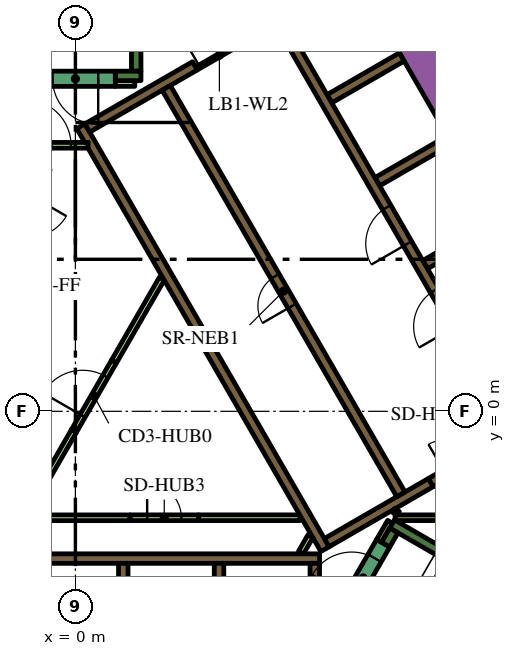
"""IFC4 building model, lengths in metres.
Left out: names, types, materials, properties, quantities, classifications, styles, units other than length and angle.
Written with IfcOpenShell. Run it as: python <this file> out.ifc"""

import sys

from ifc_helpers import new_model, si_unit, direction, frame, frame_2d, origin, place, context, subcontext, project, spatial, polyline, rectangle, outline, extrude, element, fill, save


model = new_model("IFC4")
c1 = context("Model", 3, precision=1e-05, world=origin(), true_north=direction((0.0, 1.0)))
c2 = subcontext(c1, "Body", "Model", "MODEL_VIEW")
j1 = project(units=[si_unit("LENGTHUNIT", "METRE"), si_unit("PLANEANGLEUNIT", "RADIAN")], contexts=[c1])
p1 = place(None, origin())
s1 = spatial("IfcSite", under=j1, at=p1, CompositionType="ELEMENT")
p2 = place(p1, origin())
s2 = spatial("IfcBuilding", under=s1, at=p2, CompositionType="ELEMENT")
p3 = place(p2, frame((0.0, 0.0, 54.9)))
s3 = spatial("IfcBuildingStorey", under=s2, at=p3, CompositionType="ELEMENT", Elevation=54.9)
p4 = place(p3, frame((6.776, 13.364, 0.0), z_axis=(0.0, 0.0, 1.0), x_axis=(0.500004177138, -0.8660229921, 0.0)))
e1 = element("IfcWall", 1, at=p4, inside=s3, PredefinedType="SOLIDWALL", context=c2, shape_type="SweptSolid", body=[
    extrude(rectangle(XDim=20.204, YDim=0.9, at=frame_2d((10.102, 0.0))), origin(), (0.0, 0.0, 1.0), 3.9),
])
p5 = place(p3, frame((8.334, -2.964, 0.0), z_axis=(0.0, 0.0, 1.0), x_axis=(0.866016039709, -0.500016218704, 0.0)))
e2 = element("IfcWall", 2, at=p5, inside=s3, PredefinedType="SOLIDWALL", context=c2, shape_type="SweptSolid", body=[
    extrude(rectangle(XDim=7.05, YDim=0.25, at=frame_2d((3.525, 0.0))), origin(), (0.0, 0.0, 1.0), 3.9),
])
p6 = place(p3, frame((8.163, -3.511, 0.0), z_axis=(0.0, 0.0, 1.0), x_axis=(0.500127794843, 0.865951608824, 0.0)))
e3 = element("IfcWall", 3, at=p6, inside=s3, PredefinedType="SOLIDWALL", context=c2, shape_type="SweptSolid", body=[
    extrude(rectangle(XDim=0.435, YDim=0.25, at=frame_2d((0.217, 0.0))), origin(), (0.0, 0.0, 1.0), 3.9),
])
p7 = place(p3, frame((1.6, 8.95, 0.0), z_axis=(0.0, 0.0, 1.0), x_axis=(0.0, 1.0, 0.0)))
e4 = element("IfcWall", 4, at=p7, inside=s3, PredefinedType="SOLIDWALL", context=c2, shape_type="SweptSolid", body=[
    extrude(rectangle(XDim=6.8, YDim=0.25, at=frame_2d((3.4, 0.0))), origin(), (0.0, 0.0, 1.0), 3.9),
])
p8 = place(p3, frame((1.05, 8.825, 0.0), z_axis=(0.0, 0.0, 1.0), x_axis=(1.0, 0.0, 0.0)))
e5 = element("IfcWall", 5, at=p8, inside=s3, PredefinedType="SOLIDWALL", context=c2, shape_type="SweptSolid", body=[
    extrude(rectangle(XDim=0.675, YDim=0.25, at=frame_2d((0.337, 0.0))), origin(), (0.0, 0.0, 1.0), 3.9),
])
p9 = place(p3, frame((-6.19, -3.875, 0.0), z_axis=(0.0, 0.0, 1.0), x_axis=(1.0, 0.0, 0.0)))
e6 = element("IfcWall", 6, at=p9, inside=s3, PredefinedType="SOLIDWALL", context=c2, shape_type="SweptSolid", body=[
    extrude(rectangle(XDim=12.615, YDim=0.25, at=frame_2d((6.307, 0.0))), origin(), (0.0, 0.0, 1.0), 3.9),
])
p10 = place(p3, frame((6.3, -7.268, 0.0), z_axis=(0.0, 0.0, 1.0), x_axis=(0.0, 1.0, 0.0)))
e7 = element("IfcWall", 7, at=p10, inside=s3, PredefinedType="SOLIDWALL", context=c2, shape_type="SweptSolid", body=[
    extrude(rectangle(XDim=3.268, YDim=0.25, at=frame_2d((1.634, 0.0))), origin(), (0.0, 0.0, 1.0), 3.9),
])
for number, where, z_axis, x_axis in (
    (8, (3.78, -4.0, 0.0), (0.0, 0.0, 1.0), (0.0, -1.0, 0.0)),
    (9, (1.26, -4.0, 0.0), (0.0, 0.0, 1.0), (0.0, -1.0, 0.0)),
):
    element("IfcWall", number, at=place(p3, frame(where, z_axis=z_axis, x_axis=x_axis)), inside=s3, PredefinedType="SOLIDWALL", context=c2, shape_type="SweptSolid", body=[
        extrude(rectangle(XDim=2.2, YDim=0.25, at=frame_2d((1.1, 0.0))), origin(), (0.0, 0.0, 1.0), 3.9),
    ])
p11 = place(p3, origin())
e10 = element("IfcWall", 10, at=p11, inside=s3, PredefinedType="SOLIDWALL", context=c2, shape_type="SweptSolid", body=[
    extrude(outline(polyline([(0.335, 6.925), (0.335, 6.925), (0.335, 7.075), (0.335, 7.075), (0.335, 7.075), (0.245, 7.075), (0.079, 7.363), (0.035, 7.439), (0.252, 7.564), (0.377, 7.348), (6.552, -3.348), (6.677, -3.564), (6.46, -3.689), (4.897, -0.981), (0.332, 6.925), (0.335, 6.925), (0.335, 6.925)])), origin(), (0.0, 0.0, 1.0), 3.9),
])
p12 = place(p3, frame((0.314, 7.456, 0.0), z_axis=(0.0, 0.0, 1.0), x_axis=(0.866013897511, 0.50001992892, 0.0)))
e11 = element("IfcWall", 11, at=p12, inside=s3, PredefinedType="SOLIDWALL", context=c2, shape_type="SweptSolid", body=[
    extrude(rectangle(XDim=3.268, YDim=0.25, at=frame_2d((1.634, 0.0))), origin(), (0.0, 0.0, 1.0), 3.9),
])
p13 = place(p3, frame((9.352, -1.875, 0.0), z_axis=(0.0, 0.0, 1.0), x_axis=(-0.866024844342, -0.500000968981, 0.0)))
e12 = element("IfcWall", 12, at=p13, inside=s3, PredefinedType="SOLIDWALL", context=c2, shape_type="SweptSolid", body=[
    extrude(rectangle(XDim=3.162, YDim=0.25, at=frame_2d((1.581, 0.0))), origin(), (0.0, 0.0, 1.0), 3.9),
])
for number, where, z_axis, x_axis in (
    (13, (6.684, 8.224, 0.0), (0.0, 0.0, 1.0), (0.866, 0.5, 0.0)),
    (14, (7.944, 6.041, 0.0), (0.0, 0.0, 1.0), (0.866, 0.5, 0.0)),
    (15, (9.204, 3.859, 0.0), (0.0, 0.0, 1.0), (0.866, 0.5, 0.0)),
):
    element("IfcWall", number, at=place(p3, frame(where, z_axis=z_axis, x_axis=x_axis)), inside=s3, PredefinedType="SOLIDWALL", context=c2, shape_type="SweptSolid", body=[
        extrude(rectangle(XDim=2.2, YDim=0.25, at=frame_2d((1.1, 0.0))), origin(), (0.0, 0.0, 1.0), 3.9),
    ])
p14 = place(p3, frame((-6.086, -2.801, 0.0), z_axis=(0.0, 0.0, 1.0), x_axis=(1.0, 0.0, 0.0)))
e16 = element("IfcWall", 16, at=p14, inside=s3, PredefinedType="PARTITIONING", context=c2, shape_type="SweptSolid", body=[
    extrude(rectangle(XDim=7.524, YDim=0.15, at=frame_2d((3.762, 0.0))), origin(), (0.0, 0.0, 1.0), 2.75),
])
p15 = place(p3, frame((-1.208, -2.544, 0.0), z_axis=(0.0, 0.0, 1.0), x_axis=(0.499995339376, 0.86602809458, 0.0)))
e17 = element("IfcWall", 17, at=p15, inside=s3, PredefinedType="PARTITIONING", context=c2, shape_type="SweptSolid", body=[
    extrude(rectangle(XDim=2.349, YDim=0.15, at=frame_2d((1.175, 0.0))), origin(), (0.0, 0.0, 1.0), 2.75),
])
p16 = place(p3, frame((5.936, -3.718, 0.0), z_axis=(0.0, 0.0, 1.0), x_axis=(0.499890179513, 0.866088799389, 0.0)))
e18 = element("IfcWall", 18, at=p16, inside=s3, PredefinedType="PARTITIONING", context=c2, shape_type="SweptSolid", body=[
    extrude(rectangle(XDim=0.504, YDim=0.15, at=frame_2d((0.252, 0.0))), origin(), (0.0, 0.0, 1.0), 2.75),
])
p17 = place(p3, frame((8.412, -2.8, 0.0), z_axis=(0.0, 0.0, 1.0), x_axis=(1.0, 0.0, 0.0)))
e19 = element("IfcWall", 19, at=p17, inside=s3, PredefinedType="PARTITIONING", context=c2, shape_type="SweptSolid", body=[
    extrude(rectangle(XDim=2.702, YDim=0.15, at=frame_2d((1.351, 0.0))), origin(), (0.0, 0.0, 1.0), 3.9),
])
p18 = place(p3, frame((8.459, -2.599, 0.0), z_axis=(0.0, 0.0, 1.0), x_axis=(-0.501919277433, -0.864914469148, 0.0)))
e20 = element("IfcWall", 20, at=p18, inside=s3, PredefinedType="PARTITIONING", context=c2, shape_type="SweptSolid", body=[
    extrude(rectangle(XDim=0.109, YDim=0.15, at=frame_2d((0.054, 0.0))), origin(), (0.0, 0.0, 1.0), 3.9),
])
p19 = place(p3, frame((8.281, -2.907, 0.0), z_axis=(0.0, 0.0, 1.0), x_axis=(-0.500193841991, -0.86591346013, 0.0)))
e21 = element("IfcWall", 21, at=p19, inside=s3, PredefinedType="PARTITIONING", context=c2, shape_type="SweptSolid", body=[
    extrude(rectangle(XDim=0.583, YDim=0.15, at=frame_2d((0.292, 0.0))), origin(), (0.0, 0.0, 1.0), 3.9),
])
p20 = place(p3, frame((3.238, -2.8, 0.0), z_axis=(0.0, 0.0, 1.0), x_axis=(1.0, 0.0, 0.0)))
e22 = element("IfcWall", 22, at=p20, inside=s3, PredefinedType="PARTITIONING", context=c2, shape_type="SweptSolid", body=[
    extrude(rectangle(XDim=2.672, YDim=0.15, at=frame_2d((1.336, 0.0))), origin(), (0.0, 0.0, 1.0), 2.75),
])
p21 = place(p3, frame((1.016, 1.309, 0.0), z_axis=(0.0, 0.0, 1.0), x_axis=(0.49998231768, 0.866035612436, 0.0)))
e23 = element("IfcWall", 23, at=p21, inside=s3, PredefinedType="PARTITIONING", context=c2, shape_type="SweptSolid", body=[
    extrude(rectangle(XDim=2.521, YDim=0.15, at=frame_2d((1.26, 0.0))), origin(), (0.0, 0.0, 1.0), 2.75),
])
p22 = place(p3, frame((1.05, 8.625, 0.0), z_axis=(0.0, 0.0, 1.0), x_axis=(1.0, 0.0, 0.0)))
e24 = element("IfcWall", 24, at=p22, inside=s3, PredefinedType="PARTITIONING", context=c2, shape_type="SweptSolid", body=[
    extrude(rectangle(XDim=0.514, YDim=0.15, at=frame_2d((0.257, 0.0))), origin(), (0.0, 0.0, 1.0), 2.75),
])
p23 = place(p3, frame((11.553, -0.46, 0.0), z_axis=(0.0, 0.0, 1.0), x_axis=(-0.500006514828, 0.866021642414, 0.0)))
e25 = element("IfcWall", 25, at=p23, inside=s3, PredefinedType="SOLIDWALL", context=c2, shape_type="SweptSolid", body=[
    extrude(rectangle(XDim=12.35, YDim=0.25, at=frame_2d((6.175, 0.0))), origin(), (0.0, 0.0, 1.0), 3.9),
])
p24 = place(p23, frame((0.585, 0.0, 0.0)))
e26 = element("IfcOpeningElement", 26, at=p24, cuts=e25, PredefinedType="OPENING", context=c2, shape_type="SweptSolid", body=[
    extrude(rectangle(XDim=1.1, YDim=2.1, at=frame_2d((0.55, 1.05))), frame((0.0, 0.135, 0.0), z_axis=(0.0, -1.0, 0.0), x_axis=(1.0, 0.0, 0.0)), (0.0, 0.0, 1.0), 0.27),
])
p25 = place(p23, frame((3.105, 0.0, 0.0)))
e27 = element("IfcOpeningElement", 27, at=p25, cuts=e25, PredefinedType="OPENING", context=c2, shape_type="SweptSolid", body=[
    extrude(rectangle(XDim=1.1, YDim=2.1, at=frame_2d((0.55, 1.05))), frame((0.0, 0.135, 0.0), z_axis=(0.0, -1.0, 0.0), x_axis=(1.0, 0.0, 0.0)), (0.0, 0.0, 1.0), 0.27),
])
p26 = place(p23, frame((5.625, 0.0, 0.0)))
e28 = element("IfcOpeningElement", 28, at=p26, cuts=e25, PredefinedType="OPENING", context=c2, shape_type="SweptSolid", body=[
    extrude(rectangle(XDim=1.1, YDim=2.1, at=frame_2d((0.55, 1.05))), frame((0.0, 0.135, 0.0), z_axis=(0.0, -1.0, 0.0), x_axis=(1.0, 0.0, 0.0)), (0.0, 0.0, 1.0), 0.27),
])
p27 = place(p3, frame((8.565, -2.185, 0.0), z_axis=(0.0, 0.0, 1.0), x_axis=(-0.499997954832, 0.866026584559, 0.0)))
e29 = element("IfcWall", 29, at=p27, inside=s3, PredefinedType="SOLIDWALL", context=c2, shape_type="SweptSolid", body=[
    extrude(rectangle(XDim=12.35, YDim=0.25, at=frame_2d((6.175, 0.0))), origin(), (0.0, 0.0, 1.0), 3.9),
])
p28 = place(p27, frame((5.725, 0.0, 0.0)))
e30 = element("IfcOpeningElement", 30, at=p28, cuts=e29, PredefinedType="OPENING", context=c2, shape_type="SweptSolid", body=[
    extrude(rectangle(XDim=0.9, YDim=2.1, at=frame_2d((0.45, 1.05))), frame((0.0, 0.135, 0.0), z_axis=(0.0, -1.0, 0.0), x_axis=(1.0, 0.0, 0.0)), (0.0, 0.0, 1.0), 0.27),
])
p29 = place(p3, frame((7.048, -5.292, 0.0), z_axis=(0.0, 0.0, 1.0), x_axis=(0.49994051562, 0.866059744384, 0.0)))
e31 = element("IfcWall", 31, at=p29, inside=s3, PredefinedType="SOLIDWALL", context=c2, shape_type="SweptSolid", body=[
    extrude(rectangle(XDim=2.1, YDim=0.4, at=frame_2d((1.05, 0.0))), origin(), (0.0, 0.0, 1.0), 3.9),
])
p30 = place(p29, frame((0.45, 0.0, 0.0)))
e32 = element("IfcOpeningElement", 32, at=p30, cuts=e31, PredefinedType="OPENING", context=c2, shape_type="SweptSolid", body=[
    extrude(rectangle(XDim=1.2, YDim=2.1, at=frame_2d((0.6, 1.05))), frame((0.0, 0.21, 0.0), z_axis=(0.0, -1.0, 0.0), x_axis=(1.0, 0.0, 0.0)), (0.0, 0.0, 1.0), 0.42),
])
p31 = place(p3, frame((1.05, 8.75, 0.0), z_axis=(0.0, 0.0, 1.0), x_axis=(-1.0, 0.0, 0.0)))
e33 = element("IfcWall", 33, at=p31, inside=s3, PredefinedType="SOLIDWALL", context=c2, shape_type="SweptSolid", body=[
    extrude(rectangle(XDim=2.1, YDim=0.4, at=frame_2d((1.05, 0.0))), origin(), (0.0, 0.0, 1.0), 3.9),
])
p32 = place(p31, frame((0.45, 0.0, 0.0)))
e34 = element("IfcOpeningElement", 34, at=p32, cuts=e33, PredefinedType="OPENING", context=c2, shape_type="SweptSolid", body=[
    extrude(rectangle(XDim=1.2, YDim=2.1, at=frame_2d((0.6, 1.05))), frame((0.0, 0.21, 0.0), z_axis=(0.0, -1.0, 0.0), x_axis=(1.0, 0.0, 0.0)), (0.0, 0.0, 1.0), 0.42),
])
p33 = place(p3, frame((-1.765, 7.0, 0.0), z_axis=(0.0, 0.0, 1.0), x_axis=(1.0, 0.0, 0.0)))
e35 = element("IfcWall", 35, at=p33, inside=s3, PredefinedType="PARTITIONING", context=c2, shape_type="SweptSolid", body=[
    extrude(rectangle(XDim=2.1, YDim=0.15, at=frame_2d((1.05, 0.0))), origin(), (0.0, 0.0, 1.0), 2.75),
])
p34 = place(p33, frame((0.45, 0.0, 0.0)))
e36 = element("IfcOpeningElement", 36, at=p34, cuts=e35, PredefinedType="OPENING", context=c2, shape_type="SweptSolid", body=[
    extrude(rectangle(XDim=1.2, YDim=2.1, at=frame_2d((0.6, 1.05))), frame((0.0, 0.085, 0.0), z_axis=(0.0, -1.0, 0.0), x_axis=(1.0, 0.0, 0.0)), (0.0, 0.0, 1.0), 0.17),
])
p35 = place(p3, frame((-0.034, -0.509, 0.0), z_axis=(0.0, 0.0, 1.0), x_axis=(0.49994051562, 0.866059744384, 0.0)))
e37 = element("IfcWall", 37, at=p35, inside=s3, PredefinedType="PARTITIONING", context=c2, shape_type="SweptSolid", body=[
    extrude(rectangle(XDim=2.1, YDim=0.15, at=frame_2d((1.05, 0.0))), origin(), (0.0, 0.0, 1.0), 2.75),
])
p36 = place(p35, frame((0.45, 0.0, 0.0)))
e38 = element("IfcOpeningElement", 38, at=p36, cuts=e37, PredefinedType="OPENING", context=c2, shape_type="SweptSolid", body=[
    extrude(rectangle(XDim=1.2, YDim=2.1, at=frame_2d((0.6, 1.05))), frame((0.0, 0.085, 0.0), z_axis=(0.0, -1.0, 0.0), x_axis=(1.0, 0.0, 0.0)), (0.0, 0.0, 1.0), 0.17),
])
p37 = place(p3, frame((3.183, 9.02, 0.0), z_axis=(0.0, 0.0, 1.0), x_axis=(0.866034573852, 0.49998411664, 0.0)))
e39 = element("IfcWall", 39, at=p37, inside=s3, PredefinedType="PARTITIONING", context=c2, shape_type="SweptSolid", body=[
    extrude(rectangle(XDim=1.4, YDim=0.09, at=frame_2d((0.7, 0.0))), origin(), (0.0, 0.0, 1.0), 2.75),
])
p38 = place(p37, frame((0.1, 0.0, 0.0)))
e40 = element("IfcOpeningElement", 40, at=p38, cuts=e39, PredefinedType="OPENING", context=c2, shape_type="SweptSolid", body=[
    extrude(rectangle(XDim=1.2, YDim=2.1, at=frame_2d((0.6, 1.05))), frame((0.0, 0.055, 0.0), z_axis=(0.0, -1.0, 0.0), x_axis=(1.0, 0.0, 0.0)), (0.0, 0.0, 1.0), 0.11),
])
p39 = place(p3, frame((9.352, -1.875, 0.0), z_axis=(0.0, 0.0, 1.0), x_axis=(0.865989075817, 0.500062916607, 0.0)))
e41 = element("IfcWall", 41, at=p39, inside=s3, PredefinedType="SOLIDWALL", context=c2, shape_type="SweptSolid", body=[
    extrude(rectangle(XDim=1.8, YDim=0.25, at=frame_2d((0.9, 0.0))), origin(), (0.0, 0.0, 1.0), 3.9),
])
p40 = place(p39, frame((0.45, 0.0, 0.0)))
e42 = element("IfcOpeningElement", 42, at=p40, cuts=e41, PredefinedType="OPENING", context=c2, shape_type="SweptSolid", body=[
    extrude(rectangle(XDim=0.9, YDim=2.1, at=frame_2d((0.45, 1.05))), frame((0.0, 0.135, 0.0), z_axis=(0.0, -1.0, 0.0), x_axis=(1.0, 0.0, 0.0)), (0.0, 0.0, 1.0), 0.27),
])
p41 = place(p3, frame((1.438, -2.8, 0.0), z_axis=(0.0, 0.0, 1.0), x_axis=(1.0, 0.0, 0.0)))
e43 = element("IfcWall", 43, at=p41, inside=s3, PredefinedType="PARTITIONING", context=c2, shape_type="SweptSolid", body=[
    extrude(rectangle(XDim=1.8, YDim=0.15, at=frame_2d((0.9, 0.0))), origin(), (0.0, 0.0, 1.0), 2.75),
])
p42 = place(p41, frame((0.45, 0.0, 0.0)))
e44 = element("IfcOpeningElement", 44, at=p42, cuts=e43, PredefinedType="OPENING", context=c2, shape_type="SweptSolid", body=[
    extrude(rectangle(XDim=0.9, YDim=2.1, at=frame_2d((0.45, 1.05))), frame((0.0, 0.085, 0.0), z_axis=(0.0, -1.0, 0.0), x_axis=(1.0, 0.0, 0.0)), (0.0, 0.0, 1.0), 0.17),
])
p43 = place(p3, frame((6.163, 18.475, 0.0), z_axis=(0.0, 0.0, 1.0), x_axis=(0.500001317485, -0.866024643133, 0.0)))
e45 = element("IfcWall", 45, at=p43, inside=s3, PredefinedType="PARTITIONING", context=c2, shape_type="SweptSolid", body=[
    extrude(rectangle(XDim=25.767, YDim=0.15, at=frame_2d((12.883, 0.0))), origin(), (0.0, 0.0, 1.0), 2.75),
])
p44 = place(p43, frame((24.586, 0.0, 0.0)))
e46 = element("IfcOpeningElement", 46, at=p44, cuts=e45, PredefinedType="OPENING", context=c2, shape_type="SweptSolid", body=[
    extrude(rectangle(XDim=1.0, YDim=2.1, at=frame_2d((0.5, 1.05))), frame((0.0, 0.085, 0.0), z_axis=(0.0, -1.0, 0.0), x_axis=(1.0, 0.0, 0.0)), (0.0, 0.0, 1.0), 0.17),
])
p45 = place(p43, frame((13.144, 0.0, 0.0)))
e47 = element("IfcOpeningElement", 47, at=p45, cuts=e45, PredefinedType="OPENING", context=c2, shape_type="SweptSolid", body=[
    extrude(rectangle(XDim=1.0, YDim=2.1, at=frame_2d((0.5, 1.05))), frame((0.0, 0.085, 0.0), z_axis=(0.0, -1.0, 0.0), x_axis=(1.0, 0.0, 0.0)), (0.0, 0.0, 1.0), 0.17),
])
p46 = place(p43, frame((11.692, 0.0, 0.0)))
e48 = element("IfcOpeningElement", 48, at=p46, cuts=e45, PredefinedType="OPENING", context=c2, shape_type="SweptSolid", body=[
    extrude(rectangle(XDim=1.0, YDim=2.1, at=frame_2d((0.5, 1.05))), frame((0.0, 0.085, 0.0), z_axis=(0.0, -1.0, 0.0), x_axis=(1.0, 0.0, 0.0)), (0.0, 0.0, 1.0), 0.17),
])
p47 = place(p43, frame((0.572, 0.0, 0.0)))
e49 = element("IfcOpeningElement", 49, at=p47, cuts=e45, PredefinedType="OPENING", context=c2, shape_type="SweptSolid", body=[
    extrude(rectangle(XDim=1.0, YDim=2.1, at=frame_2d((0.5, 1.05))), frame((0.0, 0.085, 0.0), z_axis=(0.0, -1.0, 0.0), x_axis=(1.0, 0.0, 0.0)), (0.0, 0.0, 1.0), 0.17),
])
p48 = place(p25, origin())
e50 = element("IfcDoor", 50, at=p48, inside=s3, OperationType="DOUBLE_DOOR_SLIDING", PredefinedType="DOOR", context=c2, shape_type="SweptSolid", body=[
    extrude(rectangle(XDim=1.1, YDim=2.1, at=frame_2d((0.55, 1.05))), frame((0.0, 0.025, 0.0), z_axis=(0.0, -1.0, 0.0), x_axis=(1.0, 0.0, 0.0)), (0.0, 0.0, 1.0), 0.05),
])
fill(e27, e50)
p49 = place(p26, origin())
e51 = element("IfcDoor", 51, at=p49, inside=s3, OperationType="DOUBLE_DOOR_SLIDING", PredefinedType="DOOR", context=c2, shape_type="SweptSolid", body=[
    extrude(rectangle(XDim=1.1, YDim=2.1, at=frame_2d((0.55, 1.05))), frame((0.0, 0.025, 0.0), z_axis=(0.0, -1.0, 0.0), x_axis=(1.0, 0.0, 0.0)), (0.0, 0.0, 1.0), 0.05),
])
fill(e28, e51)
p50 = place(p28, origin())
e52 = element("IfcDoor", 52, at=p50, inside=s3, OperationType="SINGLE_SWING_LEFT", PredefinedType="DOOR", context=c2, shape_type="SweptSolid", body=[
    extrude(rectangle(XDim=0.9, YDim=2.1, at=frame_2d((0.45, 1.05))), frame((0.0, 0.025, 0.0), z_axis=(0.0, -1.0, 0.0), x_axis=(1.0, 0.0, 0.0)), (0.0, 0.0, 1.0), 0.05),
])
fill(e30, e52)
p51 = place(p30, origin())
e53 = element("IfcDoor", 53, at=p51, inside=s3, OperationType="SINGLE_SWING_LEFT", PredefinedType="DOOR", context=c2, shape_type="SweptSolid", body=[
    extrude(rectangle(XDim=1.2, YDim=2.1, at=frame_2d((0.6, 1.05))), frame((0.0, 0.025, 0.0), z_axis=(0.0, -1.0, 0.0), x_axis=(1.0, 0.0, 0.0)), (0.0, 0.0, 1.0), 0.05),
])
fill(e32, e53)
p52 = place(p32, origin())
e54 = element("IfcDoor", 54, at=p52, inside=s3, OperationType="SINGLE_SWING_LEFT", PredefinedType="DOOR", context=c2, shape_type="SweptSolid", body=[
    extrude(rectangle(XDim=1.2, YDim=2.1, at=frame_2d((0.6, 1.05))), frame((0.0, 0.025, 0.0), z_axis=(0.0, -1.0, 0.0), x_axis=(1.0, 0.0, 0.0)), (0.0, 0.0, 1.0), 0.05),
])
fill(e34, e54)
p53 = place(p34, origin())
e55 = element("IfcDoor", 55, at=p53, inside=s3, OperationType="SINGLE_SWING_LEFT", PredefinedType="DOOR", context=c2, shape_type="SweptSolid", body=[
    extrude(rectangle(XDim=1.2, YDim=2.1, at=frame_2d((0.6, 1.05))), frame((0.0, 0.025, 0.0), z_axis=(0.0, -1.0, 0.0), x_axis=(1.0, 0.0, 0.0)), (0.0, 0.0, 1.0), 0.05),
])
fill(e36, e55)
p54 = place(p36, origin())
e56 = element("IfcDoor", 56, at=p54, inside=s3, OperationType="SINGLE_SWING_LEFT", PredefinedType="DOOR", context=c2, shape_type="SweptSolid", body=[
    extrude(rectangle(XDim=1.2, YDim=2.1, at=frame_2d((0.6, 1.05))), frame((0.0, 0.025, 0.0), z_axis=(0.0, -1.0, 0.0), x_axis=(1.0, 0.0, 0.0)), (0.0, 0.0, 1.0), 0.05),
])
fill(e38, e56)
p55 = place(p38, origin())
e57 = element("IfcDoor", 57, at=p55, inside=s3, OperationType="SINGLE_SWING_LEFT", PredefinedType="DOOR", context=c2, shape_type="SweptSolid", body=[
    extrude(rectangle(XDim=1.2, YDim=2.1, at=frame_2d((0.6, 1.05))), frame((0.0, 0.025, 0.0), z_axis=(0.0, -1.0, 0.0), x_axis=(1.0, 0.0, 0.0)), (0.0, 0.0, 1.0), 0.05),
])
fill(e40, e57)
p56 = place(p42, origin())
e58 = element("IfcDoor", 58, at=p56, inside=s3, OperationType="SINGLE_SWING_LEFT", PredefinedType="DOOR", context=c2, shape_type="SweptSolid", body=[
    extrude(rectangle(XDim=0.9, YDim=2.1, at=frame_2d((0.45, 1.05))), frame((0.0, 0.025, 0.0), z_axis=(0.0, -1.0, 0.0), x_axis=(1.0, 0.0, 0.0)), (0.0, 0.0, 1.0), 0.05),
])
fill(e44, e58)
save(model, sys.argv[1])
